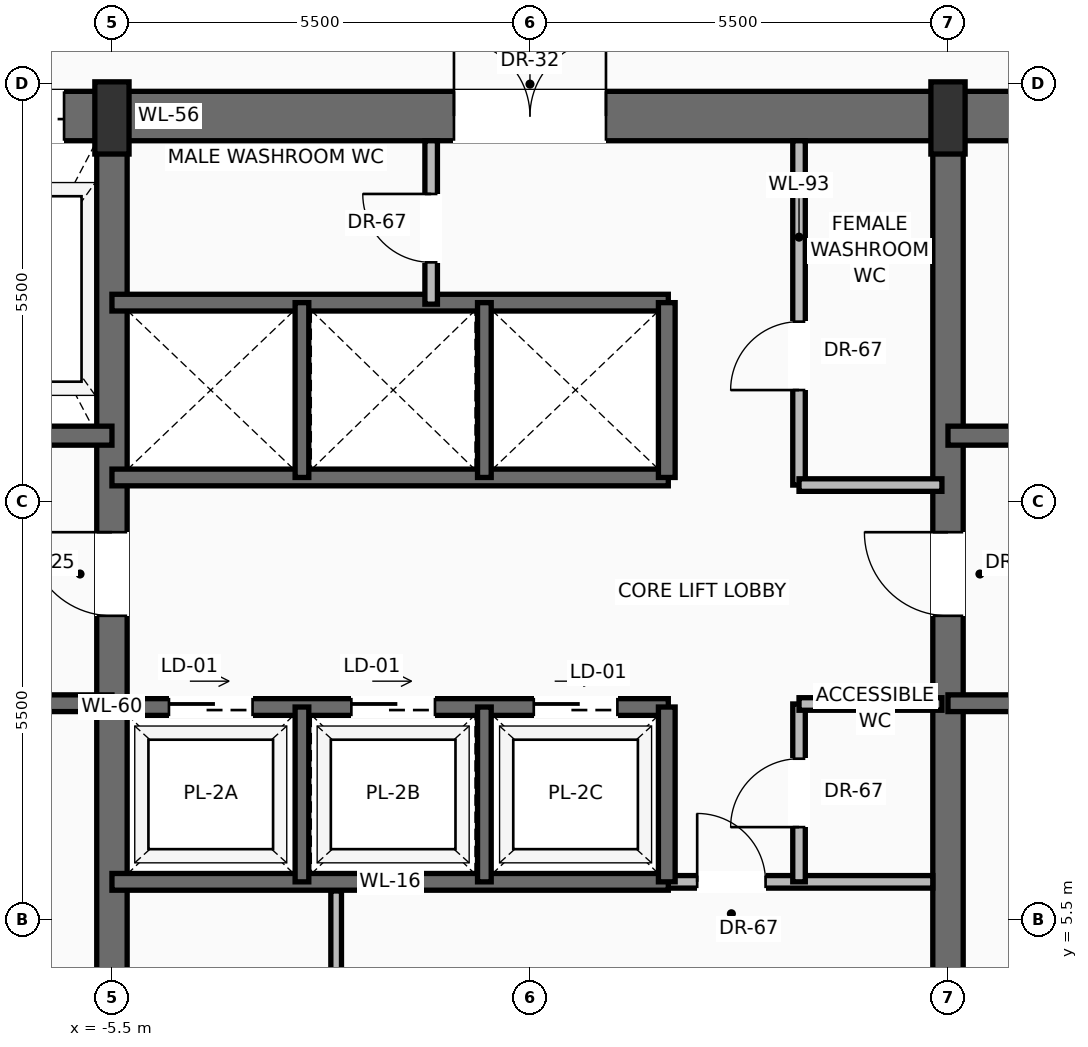
"""IFC4 building model, lengths in metres.
Left out: names, types, materials, properties, quantities, classifications, styles, units other than length and angle.
Written with IfcOpenShell. Run it as: python <this file> out.ifc"""

import sys

from ifc_helpers import new_model, si_unit, direction, frame, frame_2d, origin, origin_2d, place, context, subcontext, project, spatial, rectangle, extrude, source, transform, mapped, element, fill, save


model = new_model("IFC4")
c1 = context("Model", 3, precision=1e-05, world=origin(), true_north=direction((0.0, 1.0)))
c2 = subcontext(c1, "Body", "Model", "MODEL_VIEW")
j1 = project(units=[si_unit("LENGTHUNIT", "METRE"), si_unit("PLANEANGLEUNIT", "RADIAN")], contexts=[c1])
p1 = place(None, origin())
s1 = spatial("IfcSite", under=j1, at=p1, CompositionType="ELEMENT")
p2 = place(p1, origin())
s2 = spatial("IfcBuilding", under=s1, at=p2, CompositionType="ELEMENT")
p3 = place(p2, frame((0.0, 0.0, 158.9)))
s3 = spatial("IfcBuildingStorey", under=s2, at=p3, CompositionType="ELEMENT", Elevation=158.9)
p4 = place(p3, frame((-10.8, 16.075, 0.0), z_axis=(0.0, 0.0, 1.0), x_axis=(1.0, 0.0, 0.0)))
e1 = element("IfcWall", 1, at=p4, inside=s3, PredefinedType="SHEAR", context=c2, shape_type="SweptSolid", body=[
    extrude(rectangle(XDim=21.6, YDim=0.65, at=frame_2d((10.8, 0.0))), origin(), (0.0, 0.0, 1.0), 3.47),
])
p5 = place(p4, frame((3.37, 0.0, 0.0)))
e2 = element("IfcOpeningElement", 2, at=p5, cuts=e1, PredefinedType="OPENING", context=c2, shape_type="SweptSolid", body=[
    extrude(rectangle(XDim=1.3, YDim=2.3, at=frame_2d((0.65, 1.15))), frame((0.0, 0.335, 0.0), z_axis=(0.0, -1.0, 0.0), x_axis=(1.0, 0.0, 0.0)), (0.0, 0.0, 1.0), 0.67),
])
p6 = place(p4, frame((9.8, 0.0, 0.0)))
e3 = element("IfcOpeningElement", 3, at=p6, cuts=e1, PredefinedType="OPENING", context=c2, shape_type="SweptSolid", body=[
    extrude(rectangle(XDim=2.0, YDim=2.4, at=frame_2d((1.0, 1.2))), frame((0.0, 0.335, 0.0), z_axis=(0.0, -1.0, 0.0), x_axis=(1.0, 0.0, 0.0)), (0.0, 0.0, 1.0), 0.67),
])
p7 = place(p3, frame((-5.5, 0.525, 0.0), z_axis=(0.0, 0.0, 1.0), x_axis=(0.0, 1.0, 0.0)))
e4 = element("IfcWall", 4, at=p7, inside=s3, PredefinedType="SHEAR", context=c2, shape_type="SweptSolid", body=[
    extrude(rectangle(XDim=15.55, YDim=0.4, at=frame_2d((7.775, 0.0))), origin(), (0.0, 0.0, 1.0), 3.47),
])
p8 = place(p7, frame((8.975, 0.0, 0.0)))
e5 = element("IfcOpeningElement", 5, at=p8, cuts=e4, PredefinedType="OPENING", context=c2, shape_type="SweptSolid", body=[
    extrude(rectangle(XDim=1.1, YDim=2.2, at=frame_2d((0.55, 1.1))), frame((0.0, 0.21, 0.0), z_axis=(0.0, -1.0, 0.0), x_axis=(1.0, 0.0, 0.0)), (0.0, 0.0, 1.0), 0.42),
])
p9 = place(p3, frame((5.5, 0.525, 0.0), z_axis=(0.0, 0.0, 1.0), x_axis=(0.0, 1.0, 0.0)))
e6 = element("IfcWall", 6, at=p9, inside=s3, PredefinedType="SHEAR", context=c2, shape_type="SweptSolid", body=[
    extrude(rectangle(XDim=15.55, YDim=0.4, at=frame_2d((7.775, 0.0))), origin(), (0.0, 0.0, 1.0), 3.47),
])
p10 = place(p9, frame((8.975, 0.0, 0.0)))
e7 = element("IfcOpeningElement", 7, at=p10, cuts=e6, PredefinedType="OPENING", context=c2, shape_type="SweptSolid", body=[
    extrude(rectangle(XDim=1.1, YDim=2.2, at=frame_2d((0.55, 1.1))), frame((0.0, 0.21, 0.0), z_axis=(0.0, -1.0, 0.0), x_axis=(1.0, 0.0, 0.0)), (0.0, 0.0, 1.0), 0.42),
])
m1 = source(origin(), c2, "Body", "SweptSolid", [
    extrude(rectangle(XDim=0.45, YDim=0.95, at=origin_2d()), origin(), (0.0, 0.0, 1.0), 3.7),
])
for number, where, z_axis, x_axis in (
    (8, (-5.5, 16.05, 0.0), (0.0, 0.0, 1.0), (1.0, 0.0, 0.0)),
    (9, (5.5, 16.05, 0.0), (0.0, 0.0, 1.0), (1.0, 0.0, 0.0)),
):
    element("IfcColumn", number, at=place(p3, frame(where, z_axis=z_axis, x_axis=x_axis)), inside=s3, PredefinedType="PILASTER", context=c2, shape_type="MappedRepresentation", body=[
        mapped(m1, transform((0.0, 0.0, 0.0), scale=1.0)),
    ])
p11 = place(p3, frame((-5.5, 8.35, 0.0), z_axis=(0.0, 0.0, 1.0), x_axis=(-1.0, 0.0, 0.0)))
e10 = element("IfcWall", 10, at=p11, inside=s3, PredefinedType="SOLIDWALL", context=c2, shape_type="SweptSolid", body=[
    extrude(rectangle(XDim=4.65, YDim=0.22, at=frame_2d((2.325, 0.0))), origin(), (0.0, 0.0, 1.0), 3.47),
])
p12 = place(p11, frame((2.5, 0.0, 0.0)))
e11 = element("IfcOpeningElement", 11, at=p12, cuts=e10, PredefinedType="OPENING", context=c2, shape_type="SweptSolid", body=[
    extrude(rectangle(XDim=1.15, YDim=2.2, at=frame_2d((0.575, 1.1))), frame((0.0, 0.12, 0.0), z_axis=(0.0, -1.0, 0.0), x_axis=(1.0, 0.0, 0.0)), (0.0, 0.0, 1.0), 0.24),
])
p13 = place(p3, frame((-5.5, 11.87, 0.0), z_axis=(0.0, 0.0, 1.0), x_axis=(-1.0, 0.0, 0.0)))
e12 = element("IfcWall", 12, at=p13, inside=s3, PredefinedType="SOLIDWALL", context=c2, shape_type="SweptSolid", body=[
    extrude(rectangle(XDim=4.65, YDim=0.25, at=frame_2d((2.325, 0.0))), origin(), (0.0, 0.0, 1.0), 3.47),
])
p14 = place(p13, frame((2.95, 0.0, 0.0)))
e13 = element("IfcOpeningElement", 13, at=p14, cuts=e12, PredefinedType="OPENING", context=c2, shape_type="SweptSolid", body=[
    extrude(rectangle(XDim=1.2, YDim=2.25, at=frame_2d((0.6, 1.125))), frame((0.0, 0.135, 0.0), z_axis=(0.0, -1.0, 0.0), x_axis=(1.0, 0.0, 0.0)), (0.0, 0.0, 1.0), 0.27),
])
p15 = place(p3, frame((10.15, 8.35, 0.0), z_axis=(0.0, 0.0, 1.0), x_axis=(-1.0, 0.0, 0.0)))
e14 = element("IfcWall", 14, at=p15, inside=s3, PredefinedType="SOLIDWALL", context=c2, shape_type="SweptSolid", body=[
    extrude(rectangle(XDim=4.65, YDim=0.22, at=frame_2d((2.325, 0.0))), origin(), (0.0, 0.0, 1.0), 3.47),
])
p16 = place(p15, frame((1.0, 0.0, 0.0)))
e15 = element("IfcOpeningElement", 15, at=p16, cuts=e14, PredefinedType="OPENING", context=c2, shape_type="SweptSolid", body=[
    extrude(rectangle(XDim=1.15, YDim=2.2, at=frame_2d((0.575, 1.1))), frame((0.0, 0.12, 0.0), z_axis=(0.0, -1.0, 0.0), x_axis=(1.0, 0.0, 0.0)), (0.0, 0.0, 1.0), 0.24),
])
p17 = place(p3, frame((10.15, 11.87, 0.0), z_axis=(0.0, 0.0, 1.0), x_axis=(-1.0, 0.0, 0.0)))
e16 = element("IfcWall", 16, at=p17, inside=s3, PredefinedType="SOLIDWALL", context=c2, shape_type="SweptSolid", body=[
    extrude(rectangle(XDim=4.65, YDim=0.25, at=frame_2d((2.325, 0.0))), origin(), (0.0, 0.0, 1.0), 3.47),
])
p18 = place(p17, frame((0.5, 0.0, 0.0)))
e17 = element("IfcOpeningElement", 17, at=p18, cuts=e16, PredefinedType="OPENING", context=c2, shape_type="SweptSolid", body=[
    extrude(rectangle(XDim=1.2, YDim=2.25, at=frame_2d((0.6, 1.125))), frame((0.0, 0.135, 0.0), z_axis=(0.0, -1.0, 0.0), x_axis=(1.0, 0.0, 0.0)), (0.0, 0.0, 1.0), 0.27),
])
p19 = place(p3, frame((1.82, 6.0, 0.0), z_axis=(0.0, 0.0, 1.0), x_axis=(1.0, 0.0, 0.0)))
e18 = element("IfcWall", 18, at=p19, inside=s3, PredefinedType="PARTITIONING", context=c2, shape_type="SweptSolid", body=[
    extrude(rectangle(XDim=3.48, YDim=0.165, at=frame_2d((1.74, 0.0))), origin(), (0.0, 0.0, 1.0), 3.462),
])
p20 = place(p19, frame((0.38, 0.0, 0.0)))
e19 = element("IfcOpeningElement", 19, at=p20, cuts=e18, PredefinedType="OPENING", context=c2, shape_type="SweptSolid", body=[
    extrude(rectangle(XDim=0.9, YDim=2.1, at=frame_2d((0.45, 1.05))), frame((0.0, 0.093, 0.0), z_axis=(0.0, -1.0, 0.0), x_axis=(1.0, 0.0, 0.0)), (0.0, 0.0, 1.0), 0.185),
])
p21 = place(p3, frame((-2.55, 0.85, 0.0), z_axis=(0.0, 0.0, 1.0), x_axis=(0.0, 1.0, 0.0)))
e20 = element("IfcWall", 20, at=p21, inside=s3, PredefinedType="PARTITIONING", context=c2, shape_type="SweptSolid", body=[
    extrude(rectangle(XDim=5.03, YDim=0.14, at=frame_2d((2.515, 0.0))), origin(), (0.0, 0.0, 1.0), 3.462),
])
p22 = place(p21, frame((2.1, 0.0, 0.0)))
e21 = element("IfcOpeningElement", 21, at=p22, cuts=e20, PredefinedType="OPENING", context=c2, shape_type="SweptSolid", body=[
    extrude(rectangle(XDim=0.9, YDim=2.1, at=frame_2d((0.45, 1.05))), frame((0.0, 0.08, 0.0), z_axis=(0.0, -1.0, 0.0), x_axis=(1.0, 0.0, 0.0)), (0.0, 0.0, 1.0), 0.16),
])
p23 = place(p3, frame((3.54, 6.0, 0.0), z_axis=(0.0, 0.0, 1.0), x_axis=(0.0, 1.0, 0.0)))
e22 = element("IfcWall", 22, at=p23, inside=s3, PredefinedType="PARTITIONING", context=c2, shape_type="SweptSolid", body=[
    extrude(rectangle(XDim=2.34, YDim=0.165, at=frame_2d((1.17, 0.0))), origin(), (0.0, 0.0, 1.0), 3.462),
])
p24 = place(p23, frame((0.72, 0.0, 0.0)))
e23 = element("IfcOpeningElement", 23, at=p24, cuts=e22, PredefinedType="OPENING", context=c2, shape_type="SweptSolid", body=[
    extrude(rectangle(XDim=0.9, YDim=2.1, at=frame_2d((0.45, 1.05))), frame((0.0, 0.093, 0.0), z_axis=(0.0, -1.0, 0.0), x_axis=(1.0, 0.0, 0.0)), (0.0, 0.0, 1.0), 0.185),
])
p25 = place(p3, frame((3.54, 8.34, 0.0), z_axis=(0.0, 0.0, 1.0), x_axis=(1.0, 0.0, 0.0)))
e24 = element("IfcWall", 24, at=p25, inside=s3, PredefinedType="PARTITIONING", context=c2, shape_type="SweptSolid", body=[
    extrude(rectangle(XDim=1.88, YDim=0.165, at=frame_2d((0.94, 0.0))), origin(), (0.0, 0.0, 1.0), 3.462),
])
p26 = place(p3, frame((-5.5, 6.0, 0.0), z_axis=(0.0, 0.0, 1.0), x_axis=(1.0, 0.0, 0.0)))
e25 = element("IfcWall", 25, at=p26, inside=s3, PredefinedType="SOLIDWALL", context=c2, shape_type="SweptSolid", body=[
    extrude(rectangle(XDim=7.32, YDim=0.22, at=frame_2d((3.66, 0.0))), origin(), (0.0, 0.0, 1.0), 3.47),
])
p27 = place(p3, frame((-5.5, 8.3, 0.0), z_axis=(0.0, 0.0, 1.0), x_axis=(1.0, 0.0, 0.0)))
e26 = element("IfcWall", 26, at=p27, inside=s3, PredefinedType="SOLIDWALL", context=c2, shape_type="SweptSolid", body=[
    extrude(rectangle(XDim=7.32, YDim=0.22, at=frame_2d((3.66, 0.0))), origin(), (0.0, 0.0, 1.0), 3.47),
])
p28 = place(p27, frame((0.75, 0.0, 0.0)))
e27 = element("IfcOpeningElement", 27, at=p28, cuts=e26, PredefinedType="OPENING", context=c2, shape_type="SweptSolid", body=[
    extrude(rectangle(XDim=1.1, YDim=2.2, at=frame_2d((0.55, 1.1))), frame((0.0, 0.12, 0.0), z_axis=(0.0, -1.0, 0.0), x_axis=(1.0, 0.0, 0.0)), (0.0, 0.0, 1.0), 0.24),
])
p29 = place(p27, frame((3.15, 0.0, 0.0)))
e28 = element("IfcOpeningElement", 28, at=p29, cuts=e26, PredefinedType="OPENING", context=c2, shape_type="SweptSolid", body=[
    extrude(rectangle(XDim=1.1, YDim=2.2, at=frame_2d((0.55, 1.1))), frame((0.0, 0.12, 0.0), z_axis=(0.0, -1.0, 0.0), x_axis=(1.0, 0.0, 0.0)), (0.0, 0.0, 1.0), 0.24),
])
p30 = place(p27, frame((5.55, 0.0, 0.0)))
e29 = element("IfcOpeningElement", 29, at=p30, cuts=e26, PredefinedType="OPENING", context=c2, shape_type="SweptSolid", body=[
    extrude(rectangle(XDim=1.1, YDim=2.2, at=frame_2d((0.55, 1.1))), frame((0.0, 0.12, 0.0), z_axis=(0.0, -1.0, 0.0), x_axis=(1.0, 0.0, 0.0)), (0.0, 0.0, 1.0), 0.24),
])
p31 = place(p3, frame((1.8, 6.0, 0.0), z_axis=(0.0, 0.0, 1.0), x_axis=(0.0, 1.0, 0.0)))
e30 = element("IfcWall", 30, at=p31, inside=s3, PredefinedType="SOLIDWALL", context=c2, shape_type="SweptSolid", body=[
    extrude(rectangle(XDim=2.3, YDim=0.22, at=frame_2d((1.15, 0.0))), origin(), (0.0, 0.0, 1.0), 3.47),
])
for number, where, z_axis, x_axis in (
    (31, (-3.0, 6.0, 0.0), (0.0, 0.0, 1.0), (0.0, 1.0, 0.0)),
    (32, (-0.6, 6.0, 0.0), (0.0, 0.0, 1.0), (0.0, 1.0, 0.0)),
):
    element("IfcWall", number, at=place(p3, frame(where, z_axis=z_axis, x_axis=x_axis)), inside=s3, PredefinedType="SOLIDWALL", context=c2, shape_type="SweptSolid", body=[
        extrude(rectangle(XDim=2.3, YDim=0.18, at=frame_2d((1.15, 0.0))), origin(), (0.0, 0.0, 1.0), 3.47),
    ])
for number, where, z_axis, x_axis in (
    (33, (-5.5, 11.32, 0.0), (0.0, 0.0, 1.0), (1.0, 0.0, 0.0)),
    (34, (-5.5, 13.62, 0.0), (0.0, 0.0, 1.0), (1.0, 0.0, 0.0)),
):
    element("IfcWall", number, at=place(p3, frame(where, z_axis=z_axis, x_axis=x_axis)), inside=s3, PredefinedType="SOLIDWALL", context=c2, shape_type="SweptSolid", body=[
        extrude(rectangle(XDim=7.32, YDim=0.22, at=frame_2d((3.66, 0.0))), origin(), (0.0, 0.0, 1.0), 3.47),
    ])
p32 = place(p3, frame((1.8, 11.32, 0.0), z_axis=(0.0, 0.0, 1.0), x_axis=(0.0, 1.0, 0.0)))
e35 = element("IfcWall", 35, at=p32, inside=s3, PredefinedType="SOLIDWALL", context=c2, shape_type="SweptSolid", body=[
    extrude(rectangle(XDim=2.3, YDim=0.22, at=frame_2d((1.15, 0.0))), origin(), (0.0, 0.0, 1.0), 3.47),
])
for number, where, z_axis, x_axis in (
    (36, (-3.0, 11.32, 0.0), (0.0, 0.0, 1.0), (0.0, 1.0, 0.0)),
    (37, (-0.6, 11.32, 0.0), (0.0, 0.0, 1.0), (0.0, 1.0, 0.0)),
):
    element("IfcWall", number, at=place(p3, frame(where, z_axis=z_axis, x_axis=x_axis)), inside=s3, PredefinedType="SOLIDWALL", context=c2, shape_type="SweptSolid", body=[
        extrude(rectangle(XDim=2.3, YDim=0.18, at=frame_2d((1.15, 0.0))), origin(), (0.0, 0.0, 1.0), 3.47),
    ])
p33 = place(p3, frame((-1.3, 13.6, 0.0), z_axis=(0.0, 0.0, 1.0), x_axis=(0.0, 1.0, 0.0)))
e38 = element("IfcWall", 38, at=p33, inside=s3, PredefinedType="PARTITIONING", context=c2, shape_type="SweptSolid", body=[
    extrude(rectangle(XDim=2.15, YDim=0.165, at=frame_2d((1.075, 0.0))), origin(), (0.0, 0.0, 1.0), 3.462),
])
p34 = place(p33, frame((0.55, 0.0, 0.0)))
e39 = element("IfcOpeningElement", 39, at=p34, cuts=e38, PredefinedType="OPENING", context=c2, shape_type="SweptSolid", body=[
    extrude(rectangle(XDim=0.9, YDim=2.1, at=frame_2d((0.45, 1.05))), frame((0.0, 0.093, 0.0), z_axis=(0.0, -1.0, 0.0), x_axis=(1.0, 0.0, 0.0)), (0.0, 0.0, 1.0), 0.185),
])
p35 = place(p3, frame((3.54, 11.22, 0.0), z_axis=(0.0, 0.0, 1.0), x_axis=(0.0, 1.0, 0.0)))
e40 = element("IfcWall", 40, at=p35, inside=s3, PredefinedType="PARTITIONING", context=c2, shape_type="SweptSolid", body=[
    extrude(rectangle(XDim=4.53, YDim=0.165, at=frame_2d((2.265, 0.0))), origin(), (0.0, 0.0, 1.0), 3.462),
])
p36 = place(p35, frame((1.25, 0.0, 0.0)))
e41 = element("IfcOpeningElement", 41, at=p36, cuts=e40, PredefinedType="OPENING", context=c2, shape_type="SweptSolid", body=[
    extrude(rectangle(XDim=0.9, YDim=2.1, at=frame_2d((0.45, 1.05))), frame((0.0, 0.093, 0.0), z_axis=(0.0, -1.0, 0.0), x_axis=(1.0, 0.0, 0.0)), (0.0, 0.0, 1.0), 0.185),
])
p37 = place(p3, frame((3.54, 11.22, 0.0), z_axis=(0.0, 0.0, 1.0), x_axis=(1.0, 0.0, 0.0)))
e42 = element("IfcWall", 42, at=p37, inside=s3, PredefinedType="PARTITIONING", context=c2, shape_type="SweptSolid", body=[
    extrude(rectangle(XDim=1.88, YDim=0.165, at=frame_2d((0.94, 0.0))), origin(), (0.0, 0.0, 1.0), 3.462),
])
m2 = source(origin(), c2, "Body", "SweptSolid", [
    extrude(rectangle(XDim=1.1, YDim=2.2, at=frame_2d((0.55, 1.1))), frame((0.0, 0.025, 0.0), z_axis=(0.0, -1.0, 0.0), x_axis=(1.0, 0.0, 0.0)), (0.0, 0.0, 1.0), 0.05),
])
p38 = place(p8, origin())
e43 = element("IfcDoor", 43, at=p38, inside=s3, OperationType="SINGLE_SWING_RIGHT", PredefinedType="DOOR", context=c2, shape_type="MappedRepresentation", body=[
    mapped(m2, transform((0.0, 0.0, 0.0), scale=1.0)),
])
fill(e5, e43)
m3 = source(origin(), c2, "Body", "SweptSolid", [
    extrude(rectangle(XDim=1.3, YDim=2.3, at=frame_2d((0.65, 1.15))), frame((0.0, 0.025, 0.0), z_axis=(0.0, -1.0, 0.0), x_axis=(1.0, 0.0, 0.0)), (0.0, 0.0, 1.0), 0.05),
])
p39 = place(p5, origin())
e44 = element("IfcDoor", 44, at=p39, inside=s3, OperationType="SLIDING_TO_RIGHT", PredefinedType="DOOR", context=c2, shape_type="MappedRepresentation", body=[
    mapped(m3, transform((0.0, 0.0, 0.0), scale=1.0)),
])
fill(e2, e44)
p40 = place(p10, origin())
e45 = element("IfcDoor", 45, at=p40, inside=s3, OperationType="SINGLE_SWING_RIGHT", PredefinedType="DOOR", context=c2, shape_type="MappedRepresentation", body=[
    mapped(m2, transform((0.0, 0.0, 0.0), scale=1.0)),
])
fill(e7, e45)
m4 = source(origin(), c2, "Body", "SweptSolid", [
    extrude(rectangle(XDim=2.0, YDim=2.4, at=frame_2d((1.0, 1.2))), frame((0.0, 0.025, 0.0), z_axis=(0.0, -1.0, 0.0), x_axis=(1.0, 0.0, 0.0)), (0.0, 0.0, 1.0), 0.05),
])
p41 = place(p6, origin())
e46 = element("IfcDoor", 46, at=p41, inside=s3, OperationType="DOUBLE_DOOR_SINGLE_SWING", PredefinedType="DOOR", context=c2, shape_type="MappedRepresentation", body=[
    mapped(m4, transform((0.0, 0.0, 0.0), scale=1.0)),
])
fill(e3, e46)
m5 = source(origin(), c2, "Body", "SweptSolid", [
    extrude(rectangle(XDim=0.9, YDim=2.1, at=frame_2d((0.45, 1.05))), frame((0.0, 0.025, 0.0), z_axis=(0.0, -1.0, 0.0), x_axis=(1.0, 0.0, 0.0)), (0.0, 0.0, 1.0), 0.05),
])
p42 = place(p20, origin())
e47 = element("IfcDoor", 47, at=p42, inside=s3, OperationType="SINGLE_SWING_LEFT", PredefinedType="DOOR", context=c2, shape_type="MappedRepresentation", body=[
    mapped(m5, transform((0.0, 0.0, 0.0), scale=1.0)),
])
fill(e19, e47)
p43 = place(p24, origin())
e48 = element("IfcDoor", 48, at=p43, inside=s3, OperationType="SINGLE_SWING_LEFT", PredefinedType="DOOR", context=c2, shape_type="MappedRepresentation", body=[
    mapped(m5, transform((0.0, 0.0, 0.0), scale=1.0)),
])
fill(e23, e48)
m6 = source(origin(), c2, "Body", "SweptSolid", [
    extrude(rectangle(XDim=1.1, YDim=2.2, at=frame_2d((0.55, 1.1))), frame((0.0, 0.025, 0.0), z_axis=(0.0, -1.0, 0.0), x_axis=(1.0, 0.0, 0.0)), (0.0, 0.0, 1.0), 0.05),
])
p44 = place(p28, origin())
e49 = element("IfcDoor", 49, at=p44, inside=s3, OperationType="SLIDING_TO_LEFT", PredefinedType="DOOR", context=c2, shape_type="MappedRepresentation", body=[
    mapped(m6, transform((0.0, 0.0, 0.0), scale=1.0)),
])
fill(e27, e49)
p45 = place(p29, origin())
e50 = element("IfcDoor", 50, at=p45, inside=s3, OperationType="SLIDING_TO_LEFT", PredefinedType="DOOR", context=c2, shape_type="MappedRepresentation", body=[
    mapped(m6, transform((0.0, 0.0, 0.0), scale=1.0)),
])
fill(e28, e50)
p46 = place(p30, origin())
e51 = element("IfcDoor", 51, at=p46, inside=s3, OperationType="SLIDING_TO_LEFT", PredefinedType="DOOR", context=c2, shape_type="MappedRepresentation", body=[
    mapped(m6, transform((0.0, 0.0, 0.0), scale=1.0)),
])
fill(e29, e51)
p47 = place(p34, origin())
e52 = element("IfcDoor", 52, at=p47, inside=s3, OperationType="SINGLE_SWING_RIGHT", PredefinedType="DOOR", context=c2, shape_type="MappedRepresentation", body=[
    mapped(m5, transform((0.0, 0.0, 0.0), scale=1.0)),
])
fill(e39, e52)
p48 = place(p36, origin())
e53 = element("IfcDoor", 53, at=p48, inside=s3, OperationType="SINGLE_SWING_LEFT", PredefinedType="DOOR", context=c2, shape_type="MappedRepresentation", body=[
    mapped(m5, transform((0.0, 0.0, 0.0), scale=1.0)),
])
fill(e41, e53)
save(model, sys.argv[1])
